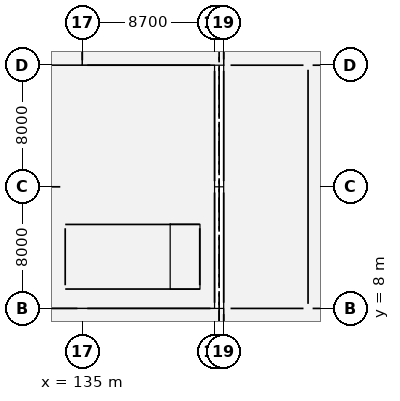
"""IFC4 building model, lengths in metres.
Left out: names, types, materials, properties, quantities, classifications, styles, units other than length and angle.
Written with IfcOpenShell. Run it as: python <this file> out.ifc"""

import sys

from ifc_helpers import new_model, si_unit, direction, frame, frame_2d, origin, origin_2d, place, context, subcontext, project, spatial, rectangle, hollow_rectangle, extrude, element, fill, save


model = new_model("IFC4")
c1 = context("Model", 3, precision=1e-05, world=origin(), true_north=direction((0.0, 1.0)))
c2 = subcontext(c1, "Body", "Model", "MODEL_VIEW")
j1 = project(units=[si_unit("LENGTHUNIT", "METRE"), si_unit("PLANEANGLEUNIT", "RADIAN")], contexts=[c1])
p1 = place(None, origin())
s1 = spatial("IfcSite", under=j1, at=p1, CompositionType="ELEMENT")
p2 = place(p1, origin())
s2 = spatial("IfcBuilding", under=s1, at=p2, CompositionType="ELEMENT")
p3 = place(p2, origin())
s3 = spatial("IfcBuildingStorey", under=s2, at=p3, CompositionType="ELEMENT", Elevation=0.0)
for number, where, z_axis, x_axis in (
    (1, (135.0, 8.0, -0.5), (0.0, 0.0, 1.0), (1.0, 0.0, 0.0)),
    (2, (135.0, 16.0, -0.5), (0.0, 0.0, 1.0), (1.0, 0.0, 0.0)),
    (3, (135.0, 24.0, -0.5), (0.0, 0.0, 1.0), (1.0, 0.0, 0.0)),
):
    element("IfcColumn", number, at=place(p3, frame(where, z_axis=z_axis, x_axis=x_axis)), inside=s3, PredefinedType="COLUMN", context=c2, shape_type="SweptSolid", body=[
        extrude(rectangle(XDim=0.65, YDim=0.65, at=origin_2d()), origin(), (0.0, 0.0, 1.0), 6.8),
    ])
for number, where, z_axis, x_axis in (
    (4, (143.7, 8.0, -0.5), (0.0, 0.0, 1.0), (1.0, 0.0, 0.0)),
    (5, (143.7, 16.0, -0.5), (0.0, 0.0, 1.0), (1.0, 0.0, 0.0)),
    (6, (143.7, 24.0, -0.5), (0.0, 0.0, 1.0), (1.0, 0.0, 0.0)),
    (7, (144.3, 8.0, -0.5), (0.0, 0.0, 1.0), (1.0, 0.0, 0.0)),
    (8, (144.3, 16.0, -0.5), (0.0, 0.0, 1.0), (1.0, 0.0, 0.0)),
    (9, (144.3, 24.0, -0.5), (0.0, 0.0, 1.0), (1.0, 0.0, 0.0)),
):
    element("IfcColumn", number, at=place(p3, frame(where, z_axis=z_axis, x_axis=x_axis)), inside=s3, PredefinedType="COLUMN", context=c2, shape_type="SweptSolid", body=[
        extrude(rectangle(XDim=0.55, YDim=0.75, at=origin_2d()), origin(), (0.0, 0.0, 1.0), 6.8),
    ])
p4 = place(p3, frame((126.325, 8.0, 0.0), z_axis=(0.0, 0.0, 1.0), x_axis=(1.0, 0.0, 0.0)))
e10 = element("IfcWall", 10, at=p4, inside=s3, PredefinedType="SOLIDWALL", context=c2, shape_type="SweptSolid", body=[
    extrude(rectangle(XDim=8.35, YDim=0.3, at=frame_2d((4.175, 0.0))), origin(), (0.0, 0.0, 1.0), 0.45),
])
p5 = place(p3, frame((135.325, 8.0, 0.0), z_axis=(0.0, 0.0, 1.0), x_axis=(1.0, 0.0, 0.0)))
e11 = element("IfcWall", 11, at=p5, inside=s3, PredefinedType="SOLIDWALL", context=c2, shape_type="SweptSolid", body=[
    extrude(rectangle(XDim=8.1, YDim=0.34, at=frame_2d((4.05, 0.0))), origin(), (0.0, 0.0, 1.0), 5.13),
])
p6 = place(p5, frame((1.8, 0.0, 0.85)))
e12 = element("IfcOpeningElement", 12, at=p6, cuts=e11, PredefinedType="OPENING", context=c2, shape_type="SweptSolid", body=[
    extrude(rectangle(XDim=1.8, YDim=3.15, at=frame_2d((0.9, 1.575))), frame((0.0, 0.18, 0.0), z_axis=(0.0, -1.0, 0.0), x_axis=(1.0, 0.0, 0.0)), (0.0, 0.0, 1.0), 0.36),
])
p7 = place(p5, frame((4.5, 0.0, 0.85)))
e13 = element("IfcOpeningElement", 13, at=p7, cuts=e11, PredefinedType="OPENING", context=c2, shape_type="SweptSolid", body=[
    extrude(rectangle(XDim=1.8, YDim=3.15, at=frame_2d((0.9, 1.575))), frame((0.0, 0.18, 0.0), z_axis=(0.0, -1.0, 0.0), x_axis=(1.0, 0.0, 0.0)), (0.0, 0.0, 1.0), 0.36),
])
p8 = place(p3, frame((135.325, 24.0, 0.0), z_axis=(0.0, 0.0, 1.0), x_axis=(1.0, 0.0, 0.0)))
e14 = element("IfcWall", 14, at=p8, inside=s3, PredefinedType="SOLIDWALL", context=c2, shape_type="SweptSolid", body=[
    extrude(rectangle(XDim=8.1, YDim=0.3, at=frame_2d((4.05, 0.0))), origin(), (0.0, 0.0, 1.0), 0.45),
])
p9 = place(p3, frame((143.7, 8.375, 0.0), z_axis=(0.0, 0.0, 1.0), x_axis=(0.0, 1.0, 0.0)))
e15 = element("IfcWall", 15, at=p9, inside=s3, PredefinedType="SOLIDWALL", context=c2, shape_type="SweptSolid", body=[
    extrude(rectangle(XDim=7.25, YDim=0.34, at=frame_2d((3.625, 0.0))), origin(), (0.0, 0.0, 1.0), 4.98),
])
p10 = place(p9, frame((1.517, 0.0, 0.85)))
e16 = element("IfcOpeningElement", 16, at=p10, cuts=e15, PredefinedType="OPENING", context=c2, shape_type="SweptSolid", body=[
    extrude(rectangle(XDim=1.8, YDim=3.15, at=frame_2d((0.9, 1.575))), frame((0.0, 0.18, 0.0), z_axis=(0.0, -1.0, 0.0), x_axis=(1.0, 0.0, 0.0)), (0.0, 0.0, 1.0), 0.36),
])
p11 = place(p9, frame((3.933, 0.0, 0.85)))
e17 = element("IfcOpeningElement", 17, at=p11, cuts=e15, PredefinedType="OPENING", context=c2, shape_type="SweptSolid", body=[
    extrude(rectangle(XDim=1.8, YDim=3.15, at=frame_2d((0.9, 1.575))), frame((0.0, 0.18, 0.0), z_axis=(0.0, -1.0, 0.0), x_axis=(1.0, 0.0, 0.0)), (0.0, 0.0, 1.0), 0.36),
])
p12 = place(p3, frame((143.7, 16.375, 0.0), z_axis=(0.0, 0.0, 1.0), x_axis=(0.0, 1.0, 0.0)))
e18 = element("IfcWall", 18, at=p12, inside=s3, PredefinedType="SOLIDWALL", context=c2, shape_type="SweptSolid", body=[
    extrude(rectangle(XDim=7.25, YDim=0.34, at=frame_2d((3.625, 0.0))), origin(), (0.0, 0.0, 1.0), 4.98),
])
p13 = place(p12, frame((1.517, 0.0, 0.85)))
e19 = element("IfcOpeningElement", 19, at=p13, cuts=e18, PredefinedType="OPENING", context=c2, shape_type="SweptSolid", body=[
    extrude(rectangle(XDim=1.8, YDim=3.15, at=frame_2d((0.9, 1.575))), frame((0.0, 0.18, 0.0), z_axis=(0.0, -1.0, 0.0), x_axis=(1.0, 0.0, 0.0)), (0.0, 0.0, 1.0), 0.36),
])
p14 = place(p12, frame((3.933, 0.0, 0.85)))
e20 = element("IfcOpeningElement", 20, at=p14, cuts=e18, PredefinedType="OPENING", context=c2, shape_type="SweptSolid", body=[
    extrude(rectangle(XDim=1.8, YDim=3.15, at=frame_2d((0.9, 1.575))), frame((0.0, 0.18, 0.0), z_axis=(0.0, -1.0, 0.0), x_axis=(1.0, 0.0, 0.0)), (0.0, 0.0, 1.0), 0.36),
])
p15 = place(p3, frame((135.0, 24.325, 0.0), z_axis=(0.0, 0.0, 1.0), x_axis=(0.0, 1.0, 0.0)))
e21 = element("IfcWall", 21, at=p15, inside=s3, PredefinedType="SOLIDWALL", context=c2, shape_type="SweptSolid", body=[
    extrude(rectangle(XDim=5.925, YDim=0.34, at=frame_2d((2.962, 0.0))), origin(), (0.0, 0.0, 1.0), 5.35),
])
p16 = place(p15, frame((0.619, 0.0, 0.85)))
e22 = element("IfcOpeningElement", 22, at=p16, cuts=e21, PredefinedType="OPENING", context=c2, shape_type="SweptSolid", body=[
    extrude(rectangle(XDim=2.0, YDim=3.3, at=frame_2d((1.0, 1.65))), frame((0.0, 0.18, 0.0), z_axis=(0.0, -1.0, 0.0), x_axis=(1.0, 0.0, 0.0)), (0.0, 0.0, 1.0), 0.36),
])
p17 = place(p15, frame((2.82, 0.0, 0.85)))
e23 = element("IfcOpeningElement", 23, at=p17, cuts=e21, PredefinedType="OPENING", context=c2, shape_type="SweptSolid", body=[
    extrude(rectangle(XDim=2.0, YDim=3.3, at=frame_2d((1.0, 1.65))), frame((0.0, 0.18, 0.0), z_axis=(0.0, -1.0, 0.0), x_axis=(1.0, 0.0, 0.0)), (0.0, 0.0, 1.0), 0.36),
])
p18 = place(p3, frame((144.3, 0.375, 0.0), z_axis=(0.0, 0.0, 1.0), x_axis=(0.0, 1.0, 0.0)))
e24 = element("IfcWall", 24, at=p18, inside=s3, PredefinedType="SOLIDWALL", context=c2, shape_type="SweptSolid", body=[
    extrude(rectangle(XDim=7.25, YDim=0.34, at=frame_2d((3.625, 0.0))), origin(), (0.0, 0.0, 1.0), 5.1),
])
p19 = place(p18, frame((1.417, 0.0, 0.85)))
e25 = element("IfcOpeningElement", 25, at=p19, cuts=e24, PredefinedType="OPENING", context=c2, shape_type="SweptSolid", body=[
    extrude(rectangle(XDim=2.0, YDim=3.3, at=frame_2d((1.0, 1.65))), frame((0.0, 0.18, 0.0), z_axis=(0.0, -1.0, 0.0), x_axis=(1.0, 0.0, 0.0)), (0.0, 0.0, 1.0), 0.36),
])
p20 = place(p18, frame((3.833, 0.0, 0.85)))
e26 = element("IfcOpeningElement", 26, at=p20, cuts=e24, PredefinedType="OPENING", context=c2, shape_type="SweptSolid", body=[
    extrude(rectangle(XDim=2.0, YDim=3.3, at=frame_2d((1.0, 1.65))), frame((0.0, 0.18, 0.0), z_axis=(0.0, -1.0, 0.0), x_axis=(1.0, 0.0, 0.0)), (0.0, 0.0, 1.0), 0.36),
])
p21 = place(p3, frame((144.3, 8.375, 0.0), z_axis=(0.0, 0.0, 1.0), x_axis=(0.0, 1.0, 0.0)))
e27 = element("IfcWall", 27, at=p21, inside=s3, PredefinedType="SOLIDWALL", context=c2, shape_type="SweptSolid", body=[
    extrude(rectangle(XDim=7.25, YDim=0.34, at=frame_2d((3.625, 0.0))), origin(), (0.0, 0.0, 1.0), 5.1),
])
p22 = place(p21, frame((1.517, 0.0, 0.85)))
e28 = element("IfcOpeningElement", 28, at=p22, cuts=e27, PredefinedType="OPENING", context=c2, shape_type="SweptSolid", body=[
    extrude(rectangle(XDim=1.8, YDim=3.15, at=frame_2d((0.9, 1.575))), frame((0.0, 0.18, 0.0), z_axis=(0.0, -1.0, 0.0), x_axis=(1.0, 0.0, 0.0)), (0.0, 0.0, 1.0), 0.36),
])
p23 = place(p21, frame((3.933, 0.0, 0.85)))
e29 = element("IfcOpeningElement", 29, at=p23, cuts=e27, PredefinedType="OPENING", context=c2, shape_type="SweptSolid", body=[
    extrude(rectangle(XDim=1.8, YDim=3.15, at=frame_2d((0.9, 1.575))), frame((0.0, 0.18, 0.0), z_axis=(0.0, -1.0, 0.0), x_axis=(1.0, 0.0, 0.0)), (0.0, 0.0, 1.0), 0.36),
])
p24 = place(p3, frame((144.3, 16.375, 0.0), z_axis=(0.0, 0.0, 1.0), x_axis=(0.0, 1.0, 0.0)))
e30 = element("IfcWall", 30, at=p24, inside=s3, PredefinedType="SOLIDWALL", context=c2, shape_type="SweptSolid", body=[
    extrude(rectangle(XDim=7.25, YDim=0.34, at=frame_2d((3.625, 0.0))), origin(), (0.0, 0.0, 1.0), 5.1),
])
p25 = place(p24, frame((1.417, 0.0, 0.85)))
e31 = element("IfcOpeningElement", 31, at=p25, cuts=e30, PredefinedType="OPENING", context=c2, shape_type="SweptSolid", body=[
    extrude(rectangle(XDim=2.0, YDim=3.3, at=frame_2d((1.0, 1.65))), frame((0.0, 0.18, 0.0), z_axis=(0.0, -1.0, 0.0), x_axis=(1.0, 0.0, 0.0)), (0.0, 0.0, 1.0), 0.36),
])
p26 = place(p24, frame((3.833, 0.0, 0.85)))
e32 = element("IfcOpeningElement", 32, at=p26, cuts=e30, PredefinedType="OPENING", context=c2, shape_type="SweptSolid", body=[
    extrude(rectangle(XDim=2.0, YDim=3.3, at=frame_2d((1.0, 1.65))), frame((0.0, 0.18, 0.0), z_axis=(0.0, -1.0, 0.0), x_axis=(1.0, 0.0, 0.0)), (0.0, 0.0, 1.0), 0.36),
])
p27 = place(p3, frame((144.3, 24.375, 0.0), z_axis=(0.0, 0.0, 1.0), x_axis=(0.0, 1.0, 0.0)))
e33 = element("IfcWall", 33, at=p27, inside=s3, PredefinedType="SOLIDWALL", context=c2, shape_type="SweptSolid", body=[
    extrude(rectangle(XDim=7.25, YDim=0.34, at=frame_2d((3.625, 0.0))), origin(), (0.0, 0.0, 1.0), 5.1),
])
p28 = place(p27, frame((1.112, 0.0, 0.85)))
e34 = element("IfcOpeningElement", 34, at=p28, cuts=e33, PredefinedType="OPENING", context=c2, shape_type="SweptSolid", body=[
    extrude(rectangle(XDim=1.8, YDim=3.15, at=frame_2d((0.9, 1.575))), frame((0.0, 0.18, 0.0), z_axis=(0.0, -1.0, 0.0), x_axis=(1.0, 0.0, 0.0)), (0.0, 0.0, 1.0), 0.36),
])
p29 = place(p27, frame((3.933, 0.0, 0.85)))
e35 = element("IfcOpeningElement", 35, at=p29, cuts=e33, PredefinedType="OPENING", context=c2, shape_type="SweptSolid", body=[
    extrude(rectangle(XDim=1.8, YDim=3.15, at=frame_2d((0.9, 1.575))), frame((0.0, 0.18, 0.0), z_axis=(0.0, -1.0, 0.0), x_axis=(1.0, 0.0, 0.0)), (0.0, 0.0, 1.0), 0.36),
])
for number, where, z_axis, x_axis in (
    (36, (133.875, 9.275, -0.5), (0.0, 0.0, 1.0), (1.0, 0.0, 0.0)),
    (37, (133.875, 13.525, -0.5), (0.0, 0.0, 1.0), (1.0, 0.0, 0.0)),
):
    element("IfcWall", number, at=place(p3, frame(where, z_axis=z_axis, x_axis=x_axis)), inside=s3, PredefinedType="SOLIDWALL", context=c2, shape_type="SweptSolid", body=[
        extrude(rectangle(XDim=8.85, YDim=0.25, at=frame_2d((4.425, 0.0))), origin(), (0.0, 0.0, 1.0), 6.8),
    ])
p30 = place(p3, frame((133.875, 9.525, -0.5), z_axis=(0.0, 0.0, 1.0), x_axis=(0.0, 1.0, 0.0)))
e38 = element("IfcWall", 38, at=p30, inside=s3, PredefinedType="SOLIDWALL", context=c2, shape_type="SweptSolid", body=[
    extrude(rectangle(XDim=3.75, YDim=0.25, at=frame_2d((1.875, 0.0))), origin(), (0.0, 0.0, 1.0), 6.8),
])
p31 = place(p30, frame((1.1, 0.0, 0.5)))
e39 = element("IfcOpeningElement", 39, at=p31, cuts=e38, PredefinedType="OPENING", context=c2, shape_type="SweptSolid", body=[
    extrude(rectangle(XDim=1.2, YDim=2.2, at=frame_2d((0.6, 1.1))), frame((0.0, 0.135, 0.0), z_axis=(0.0, -1.0, 0.0), x_axis=(1.0, 0.0, 0.0)), (0.0, 0.0, 1.0), 0.27),
])
p32 = place(p3, frame((142.725, 9.525, -0.5), z_axis=(0.0, 0.0, 1.0), x_axis=(0.0, 1.0, 0.0)))
e40 = element("IfcWall", 40, at=p32, inside=s3, PredefinedType="SOLIDWALL", context=c2, shape_type="SweptSolid", body=[
    extrude(rectangle(XDim=3.75, YDim=0.25, at=frame_2d((1.875, 0.0))), origin(), (0.0, 0.0, 1.0), 6.8),
])
for number, where, z_axis, x_axis in (
    (41, (133.875, 17.275, -0.5), (0.0, 0.0, 1.0), (1.0, 0.0, 0.0)),
    (42, (142.725, 17.275, -0.5), (0.0, 0.0, 1.0), (1.0, 0.0, 0.0)),
    (43, (133.875, 21.525, -0.5), (0.0, 0.0, 1.0), (1.0, 0.0, 0.0)),
    (44, (142.725, 21.525, -0.5), (0.0, 0.0, 1.0), (1.0, 0.0, 0.0)),
):
    element("IfcColumn", number, at=place(p3, frame(where, z_axis=z_axis, x_axis=x_axis)), inside=s3, PredefinedType="COLUMN", context=c2, shape_type="SweptSolid", body=[
        extrude(hollow_rectangle(XDim=0.2, YDim=0.2, WallThickness=0.01, InnerFilletRadius=0.01, OuterFilletRadius=0.02, at=origin_2d()), origin(), (0.0, 0.0, 1.0), 6.8),
    ])
p33 = place(p3, frame((117.3, 16.0, 0.0), z_axis=(0.0, 0.0, 1.0), x_axis=(1.0, 0.0, 0.0)))
e45 = element("IfcWall", 45, at=p33, inside=s3, PredefinedType="STANDARD", context=c2, shape_type="SweptSolid", body=[
    extrude(rectangle(XDim=16.25, YDim=0.195, at=frame_2d((8.125, 0.0))), origin(), (0.0, 0.0, 1.0), 5.13),
])
p34 = place(p33, frame((3.5, 0.0, 0.0)))
e46 = element("IfcOpeningElement", 46, at=p34, cuts=e45, PredefinedType="OPENING", context=c2, shape_type="SweptSolid", body=[
    extrude(rectangle(XDim=1.7, YDim=2.4, at=frame_2d((0.85, 1.2))), frame((0.0, 0.107, 0.0), z_axis=(0.0, -1.0, 0.0), x_axis=(1.0, 0.0, 0.0)), (0.0, 0.0, 1.0), 0.215),
])
p35 = place(p3, frame((150.15, 8.0, 0.0), z_axis=(0.0, 0.0, 1.0), x_axis=(1.0, 0.0, 0.0)))
e47 = element("IfcWall", 47, at=p35, inside=s3, PredefinedType="PARTITIONING", context=c2, shape_type="SweptSolid", body=[
    extrude(rectangle(XDim=2.55, YDim=0.14, at=frame_2d((1.275, 0.0))), origin(), (0.0, 0.0, 1.0), 5.25),
])
p36 = place(p35, frame((0.805, 0.0, 0.0)))
e48 = element("IfcOpeningElement", 48, at=p36, cuts=e47, PredefinedType="OPENING", context=c2, shape_type="SweptSolid", body=[
    extrude(rectangle(XDim=0.94, YDim=2.14, at=frame_2d((0.47, 1.07))), frame((0.0, 0.08, 0.0), z_axis=(0.0, -1.0, 0.0), x_axis=(1.0, 0.0, 0.0)), (0.0, 0.0, 1.0), 0.16),
])
p37 = place(p3, frame((144.75, 8.0, 0.0), z_axis=(0.0, 0.0, 1.0), x_axis=(1.0, 0.0, 0.0)))
e49 = element("IfcWall", 49, at=p37, inside=s3, PredefinedType="PARTITIONING", context=c2, shape_type="SweptSolid", body=[
    extrude(rectangle(XDim=4.8, YDim=0.125, at=frame_2d((2.4, 0.0))), origin(), (0.0, 0.0, 1.0), 5.25),
])
p38 = place(p3, frame((150.15, 24.0, 0.0), z_axis=(0.0, 0.0, 1.0), x_axis=(1.0, 0.0, 0.0)))
e50 = element("IfcWall", 50, at=p38, inside=s3, PredefinedType="PARTITIONING", context=c2, shape_type="SweptSolid", body=[
    extrude(rectangle(XDim=2.55, YDim=0.11, at=frame_2d((1.275, 0.0))), origin(), (0.0, 0.0, 1.0), 5.1),
])
p39 = place(p38, frame((0.805, 0.0, 0.0)))
e51 = element("IfcOpeningElement", 51, at=p39, cuts=e50, PredefinedType="OPENING", context=c2, shape_type="SweptSolid", body=[
    extrude(rectangle(XDim=0.94, YDim=2.14, at=frame_2d((0.47, 1.07))), frame((0.0, 0.065, 0.0), z_axis=(0.0, -1.0, 0.0), x_axis=(1.0, 0.0, 0.0)), (0.0, 0.0, 1.0), 0.13),
])
p40 = place(p3, frame((144.75, 24.0, 0.0), z_axis=(0.0, 0.0, 1.0), x_axis=(1.0, 0.0, 0.0)))
e52 = element("IfcWall", 52, at=p40, inside=s3, PredefinedType="PARTITIONING", context=c2, shape_type="SweptSolid", body=[
    extrude(rectangle(XDim=4.8, YDim=0.1, at=frame_2d((2.4, 0.0))), origin(), (0.0, 0.0, 1.0), 5.1),
])
p41 = place(p40, frame((1.89, 0.0, 0.0)))
e53 = element("IfcOpeningElement", 53, at=p41, cuts=e52, PredefinedType="OPENING", context=c2, shape_type="SweptSolid", body=[
    extrude(rectangle(XDim=1.02, YDim=2.18, at=frame_2d((0.51, 1.09))), frame((0.0, 0.06, 0.0), z_axis=(0.0, -1.0, 0.0), x_axis=(1.0, 0.0, 0.0)), (0.0, 0.0, 1.0), 0.12),
])
p42 = place(p3, frame((149.85, 8.3, 0.0), z_axis=(0.0, 0.0, 1.0), x_axis=(0.0, 1.0, 0.0)))
e54 = element("IfcWall", 54, at=p42, inside=s3, PredefinedType="PARTITIONING", context=c2, shape_type="SweptSolid", body=[
    extrude(rectangle(XDim=15.4, YDim=0.1, at=frame_2d((7.7, 0.0))), origin(), (0.0, 0.0, 1.0), 5.95),
])
p43 = place(p42, frame((3.31, 0.0, 0.0)))
e55 = element("IfcOpeningElement", 55, at=p43, cuts=e54, PredefinedType="OPENING", context=c2, shape_type="SweptSolid", body=[
    extrude(rectangle(XDim=1.08, YDim=2.15, at=frame_2d((0.54, 1.075))), frame((0.0, 0.06, 0.0), z_axis=(0.0, -1.0, 0.0), x_axis=(1.0, 0.0, 0.0)), (0.0, 0.0, 1.0), 0.12),
])
p44 = place(p6, origin())
e56 = element("IfcWindow", 56, at=p44, inside=s3, PartitioningType="DOUBLE_PANEL_VERTICAL", PredefinedType="WINDOW", context=c2, shape_type="SweptSolid", body=[
    extrude(rectangle(XDim=1.8, YDim=3.15, at=frame_2d((0.9, 1.575))), frame((0.0, 0.03, 0.0), z_axis=(0.0, -1.0, 0.0), x_axis=(1.0, 0.0, 0.0)), (0.0, 0.0, 1.0), 0.06),
])
fill(e12, e56)
p45 = place(p7, origin())
e57 = element("IfcWindow", 57, at=p45, inside=s3, PartitioningType="DOUBLE_PANEL_VERTICAL", PredefinedType="WINDOW", context=c2, shape_type="SweptSolid", body=[
    extrude(rectangle(XDim=1.8, YDim=3.15, at=frame_2d((0.9, 1.575))), frame((0.0, 0.03, 0.0), z_axis=(0.0, -1.0, 0.0), x_axis=(1.0, 0.0, 0.0)), (0.0, 0.0, 1.0), 0.06),
])
fill(e13, e57)
p46 = place(p10, origin())
e58 = element("IfcWindow", 58, at=p46, inside=s3, PartitioningType="DOUBLE_PANEL_VERTICAL", PredefinedType="WINDOW", context=c2, shape_type="SweptSolid", body=[
    extrude(rectangle(XDim=1.8, YDim=3.15, at=frame_2d((0.9, 1.575))), frame((0.0, 0.03, 0.0), z_axis=(0.0, -1.0, 0.0), x_axis=(1.0, 0.0, 0.0)), (0.0, 0.0, 1.0), 0.06),
])
fill(e16, e58)
p47 = place(p11, origin())
e59 = element("IfcWindow", 59, at=p47, inside=s3, PartitioningType="DOUBLE_PANEL_VERTICAL", PredefinedType="WINDOW", context=c2, shape_type="SweptSolid", body=[
    extrude(rectangle(XDim=1.8, YDim=3.15, at=frame_2d((0.9, 1.575))), frame((0.0, 0.03, 0.0), z_axis=(0.0, -1.0, 0.0), x_axis=(1.0, 0.0, 0.0)), (0.0, 0.0, 1.0), 0.06),
])
fill(e17, e59)
p48 = place(p13, origin())
e60 = element("IfcWindow", 60, at=p48, inside=s3, PartitioningType="DOUBLE_PANEL_VERTICAL", PredefinedType="WINDOW", context=c2, shape_type="SweptSolid", body=[
    extrude(rectangle(XDim=1.8, YDim=3.15, at=frame_2d((0.9, 1.575))), frame((0.0, 0.03, 0.0), z_axis=(0.0, -1.0, 0.0), x_axis=(1.0, 0.0, 0.0)), (0.0, 0.0, 1.0), 0.06),
])
fill(e19, e60)
p49 = place(p14, origin())
e61 = element("IfcWindow", 61, at=p49, inside=s3, PartitioningType="DOUBLE_PANEL_VERTICAL", PredefinedType="WINDOW", context=c2, shape_type="SweptSolid", body=[
    extrude(rectangle(XDim=1.8, YDim=3.15, at=frame_2d((0.9, 1.575))), frame((0.0, 0.03, 0.0), z_axis=(0.0, -1.0, 0.0), x_axis=(1.0, 0.0, 0.0)), (0.0, 0.0, 1.0), 0.06),
])
fill(e20, e61)
p50 = place(p22, origin())
e62 = element("IfcWindow", 62, at=p50, inside=s3, PartitioningType="DOUBLE_PANEL_VERTICAL", PredefinedType="WINDOW", context=c2, shape_type="SweptSolid", body=[
    extrude(rectangle(XDim=1.8, YDim=3.15, at=frame_2d((0.9, 1.575))), frame((0.0, 0.03, 0.0), z_axis=(0.0, -1.0, 0.0), x_axis=(1.0, 0.0, 0.0)), (0.0, 0.0, 1.0), 0.06),
])
fill(e28, e62)
p51 = place(p23, origin())
e63 = element("IfcWindow", 63, at=p51, inside=s3, PartitioningType="DOUBLE_PANEL_VERTICAL", PredefinedType="WINDOW", context=c2, shape_type="SweptSolid", body=[
    extrude(rectangle(XDim=1.8, YDim=3.15, at=frame_2d((0.9, 1.575))), frame((0.0, 0.03, 0.0), z_axis=(0.0, -1.0, 0.0), x_axis=(1.0, 0.0, 0.0)), (0.0, 0.0, 1.0), 0.06),
])
fill(e29, e63)
p52 = place(p25, origin())
e64 = element("IfcWindow", 64, at=p52, inside=s3, PartitioningType="DOUBLE_PANEL_VERTICAL", PredefinedType="WINDOW", context=c2, shape_type="SweptSolid", body=[
    extrude(rectangle(XDim=2.0, YDim=3.3, at=frame_2d((1.0, 1.65))), frame((0.0, 0.03, 0.0), z_axis=(0.0, -1.0, 0.0), x_axis=(1.0, 0.0, 0.0)), (0.0, 0.0, 1.0), 0.06),
])
fill(e31, e64)
p53 = place(p26, origin())
e65 = element("IfcWindow", 65, at=p53, inside=s3, PartitioningType="DOUBLE_PANEL_VERTICAL", PredefinedType="WINDOW", context=c2, shape_type="SweptSolid", body=[
    extrude(rectangle(XDim=2.0, YDim=3.3, at=frame_2d((1.0, 1.65))), frame((0.0, 0.03, 0.0), z_axis=(0.0, -1.0, 0.0), x_axis=(1.0, 0.0, 0.0)), (0.0, 0.0, 1.0), 0.06),
])
fill(e32, e65)
p54 = place(p31, origin())
e66 = element("IfcDoor", 66, at=p54, inside=s3, OperationType="SINGLE_SWING_RIGHT", PredefinedType="DOOR", context=c2, shape_type="SweptSolid", body=[
    extrude(rectangle(XDim=1.2, YDim=2.2, at=frame_2d((0.6, 1.1))), frame((0.0, 0.025, 0.0), z_axis=(0.0, -1.0, 0.0), x_axis=(1.0, 0.0, 0.0)), (0.0, 0.0, 1.0), 0.05),
])
fill(e39, e66)
p55 = place(p41, origin())
e67 = element("IfcDoor", 67, at=p55, inside=s3, OperationType="SINGLE_SWING_RIGHT", PredefinedType="DOOR", context=c2, shape_type="SweptSolid", body=[
    extrude(rectangle(XDim=1.02, YDim=2.18, at=frame_2d((0.51, 1.09))), frame((0.0, 0.025, 0.0), z_axis=(0.0, -1.0, 0.0), x_axis=(1.0, 0.0, 0.0)), (0.0, 0.0, 1.0), 0.05),
])
fill(e53, e67)
p56 = place(p43, origin())
e68 = element("IfcDoor", 68, at=p56, inside=s3, OperationType="SINGLE_SWING_RIGHT", PredefinedType="DOOR", context=c2, shape_type="SweptSolid", body=[
    extrude(rectangle(XDim=1.08, YDim=2.15, at=frame_2d((0.54, 1.075))), frame((0.0, 0.025, 0.0), z_axis=(0.0, -1.0, 0.0), x_axis=(1.0, 0.0, 0.0)), (0.0, 0.0, 1.0), 0.05),
])
fill(e55, e68)
save(model, sys.argv[1])
